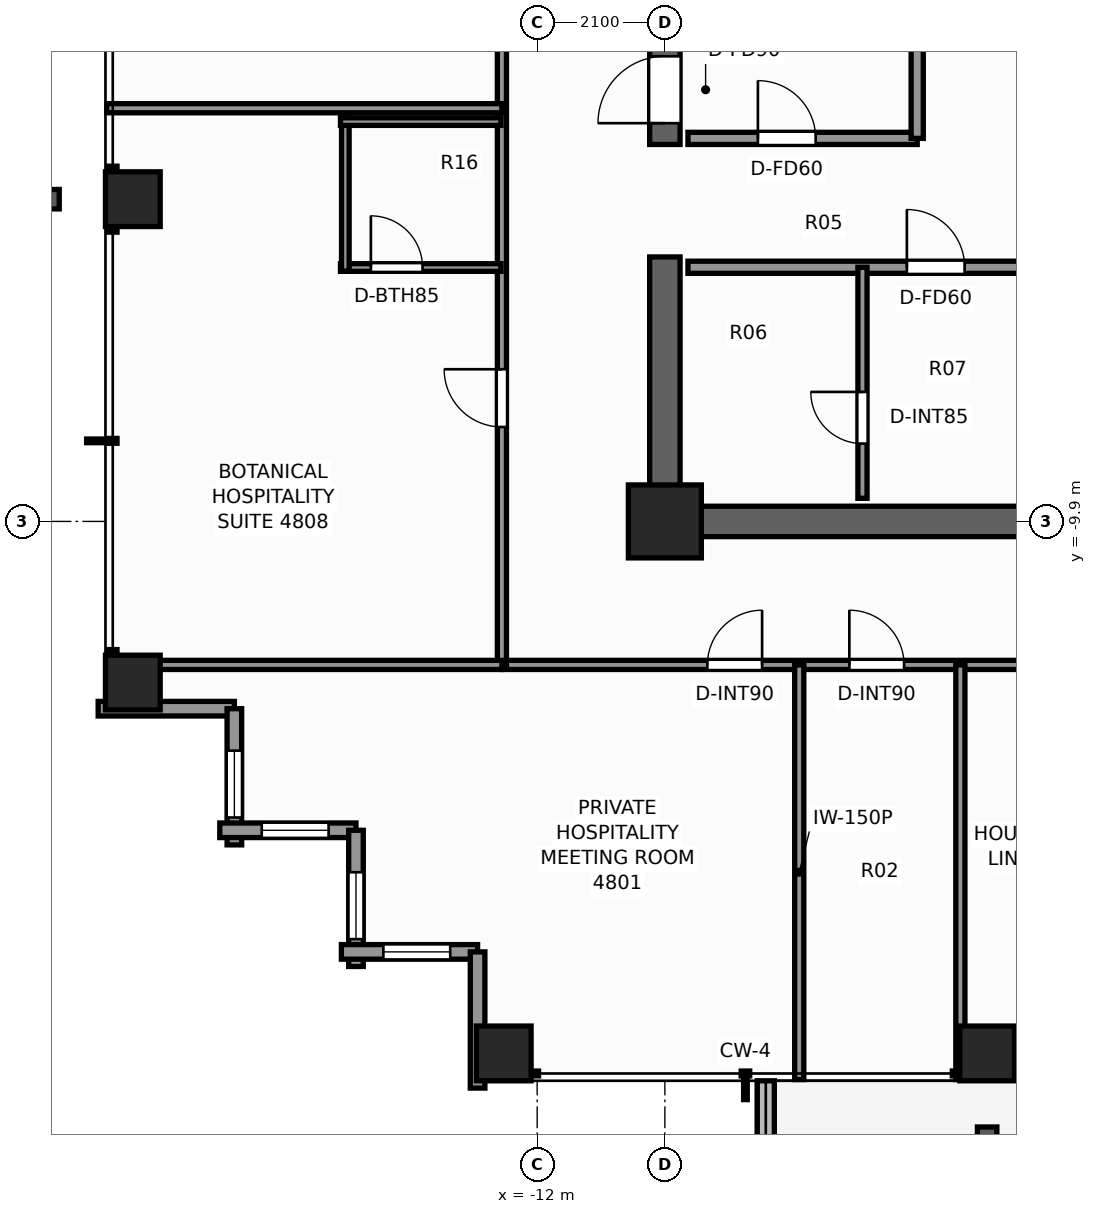
"""IFC4 building model, lengths in metres.
Left out: names, types, materials, properties, quantities, classifications, styles, units other than length and angle.
Written with IfcOpenShell. Run it as: python <this file> out.ifc"""

import sys

from ifc_helpers import new_model, si_unit, direction, frame, frame_2d, origin, origin_2d, place, context, subcontext, project, spatial, rectangle, extrude, element, fill, save


model = new_model("IFC4")
c1 = context("Model", 3, precision=1e-05, world=origin(), true_north=direction((0.0, 1.0)))
c2 = subcontext(c1, "Body", "Model", "MODEL_VIEW")
j1 = project(units=[si_unit("LENGTHUNIT", "METRE"), si_unit("PLANEANGLEUNIT", "RADIAN")], contexts=[c1])
p1 = place(None, origin())
s1 = spatial("IfcSite", under=j1, at=p1, CompositionType="ELEMENT")
p2 = place(p1, origin())
s2 = spatial("IfcBuilding", under=s1, at=p2, CompositionType="ELEMENT")
p3 = place(p2, frame((0.0, 0.0, 166.8)))
s3 = spatial("IfcBuildingStorey", under=s2, at=p3, CompositionType="ELEMENT", Elevation=166.8)
p4 = place(p3, frame((-3.54, -9.9, 0.0), z_axis=(0.0, 0.0, 1.0), x_axis=(-1.0, 0.0, 0.0)))
e1 = element("IfcWall", 1, at=p4, inside=s3, PredefinedType="SHEAR", context=c2, shape_type="SweptSolid", body=[
    extrude(rectangle(XDim=6.61, YDim=0.5, at=frame_2d((3.305, 0.0))), origin(), (0.0, 0.0, 1.0), 3.3),
])
p5 = place(p3, frame((-9.9, -9.65, 0.0), z_axis=(0.0, 0.0, 1.0), x_axis=(0.0, 1.0, 0.0)))
e2 = element("IfcWall", 2, at=p5, inside=s3, PredefinedType="SHEAR", context=c2, shape_type="SweptSolid", body=[
    extrude(rectangle(XDim=4.1, YDim=0.5, at=frame_2d((2.05, 0.0))), origin(), (0.0, 0.0, 1.0), 3.3),
])
p6 = place(p3, frame((-9.9, -3.7, 0.0), z_axis=(0.0, 0.0, 1.0), x_axis=(0.0, 1.0, 0.0)))
e3 = element("IfcWall", 3, at=p6, inside=s3, PredefinedType="SHEAR", context=c2, shape_type="SweptSolid", body=[
    extrude(rectangle(XDim=13.35, YDim=0.5, at=frame_2d((6.675, 0.0))), origin(), (0.0, 0.0, 1.0), 3.3),
])
p7 = place(p6, frame((0.35, 0.0, 0.0)))
e4 = element("IfcOpeningElement", 4, at=p7, cuts=e3, PredefinedType="OPENING", context=c2, shape_type="SweptSolid", body=[
    extrude(rectangle(XDim=1.1, YDim=2.2, at=frame_2d((0.55, 1.1))), frame((0.0, 0.26, 0.0), z_axis=(0.0, -1.0, 0.0), x_axis=(1.0, 0.0, 0.0)), (0.0, 0.0, 1.0), 0.52),
])
p8 = place(p3, frame((-9.9, -9.9, 0.0), z_axis=(0.0, 0.0, 1.0), x_axis=(1.0, 0.0, 0.0)))
e5 = element("IfcColumn", 5, at=p8, inside=s3, PredefinedType="COLUMN", context=c2, shape_type="SweptSolid", body=[
    extrude(rectangle(XDim=1.2, YDim=1.2, at=origin_2d()), origin(), (0.0, 0.0, 1.0), 3.3),
])
for number, where, z_axis, x_axis in (
    (6, (-12.55, -18.65, 0.0), (0.0, 0.0, 1.0), (1.0, 0.0, 0.0)),
    (7, (-4.6, -18.65, 0.0), (0.0, 0.0, 1.0), (1.0, 0.0, 0.0)),
    (8, (-18.65, -12.55, 0.0), (0.0, 0.0, 1.0), (1.0, 0.0, 0.0)),
    (9, (-18.65, -4.6, 0.0), (0.0, 0.0, 1.0), (1.0, 0.0, 0.0)),
):
    element("IfcColumn", number, at=place(p3, frame(where, z_axis=z_axis, x_axis=x_axis)), inside=s3, PredefinedType="COLUMN", context=c2, shape_type="SweptSolid", body=[
        extrude(rectangle(XDim=0.9, YDim=0.9, at=origin_2d()), origin(), (0.0, 0.0, 1.0), 3.3),
    ])
p9 = place(p3, frame((-8.24, -19.1, -0.02), z_axis=(0.0, 0.0, 1.0), x_axis=(0.0, -1.0, 0.0)))
e10 = element("IfcWall", 10, at=p9, inside=s3, PredefinedType="PARAPET", context=c2, shape_type="SweptSolid", body=[
    extrude(rectangle(XDim=1.466, YDim=0.28, at=frame_2d((0.733, 0.0))), origin(), (0.0, 0.0, 1.0), 0.42),
])
p10 = place(p3, frame((-16.98, -12.98, 0.0), z_axis=(0.0, 0.0, 1.0), x_axis=(-1.0, 0.0, 0.0)))
e11 = element("IfcWall", 11, at=p10, inside=s3, PredefinedType="STANDARD", context=c2, shape_type="SweptSolid", body=[
    extrude(rectangle(XDim=2.24, YDim=0.24, at=frame_2d((1.12, 0.0))), origin(), (0.0, 0.0, 1.0), 2.483),
])
p11 = place(p3, frame((-16.98, -15.22, 0.0), z_axis=(0.0, 0.0, 1.0), x_axis=(0.0, 1.0, 0.0)))
e12 = element("IfcWall", 12, at=p11, inside=s3, PredefinedType="STANDARD", context=c2, shape_type="SweptSolid", body=[
    extrude(rectangle(XDim=2.24, YDim=0.24, at=frame_2d((1.12, 0.0))), origin(), (0.0, 0.0, 1.0), 2.483),
])
p12 = place(p11, frame((0.45, 0.0, 0.65)))
e13 = element("IfcOpeningElement", 13, at=p12, cuts=e12, PredefinedType="OPENING", context=c2, shape_type="SweptSolid", body=[
    extrude(rectangle(XDim=1.1, YDim=1.45, at=frame_2d((0.55, 0.725))), frame((0.0, 0.13, 0.0), z_axis=(0.0, -1.0, 0.0), x_axis=(1.0, 0.0, 0.0)), (0.0, 0.0, 1.0), 0.26),
])
p13 = place(p3, frame((-14.98, -14.98, 0.0), z_axis=(0.0, 0.0, 1.0), x_axis=(-1.0, 0.0, 0.0)))
e14 = element("IfcWall", 14, at=p13, inside=s3, PredefinedType="STANDARD", context=c2, shape_type="SweptSolid", body=[
    extrude(rectangle(XDim=2.24, YDim=0.24, at=frame_2d((1.12, 0.0))), origin(), (0.0, 0.0, 1.0), 2.483),
])
p14 = place(p13, frame((0.45, 0.0, 0.65)))
e15 = element("IfcOpeningElement", 15, at=p14, cuts=e14, PredefinedType="OPENING", context=c2, shape_type="SweptSolid", body=[
    extrude(rectangle(XDim=1.1, YDim=1.45, at=frame_2d((0.55, 0.725))), frame((0.0, 0.13, 0.0), z_axis=(0.0, -1.0, 0.0), x_axis=(1.0, 0.0, 0.0)), (0.0, 0.0, 1.0), 0.26),
])
p15 = place(p3, frame((-14.98, -17.22, 0.0), z_axis=(0.0, 0.0, 1.0), x_axis=(0.0, 1.0, 0.0)))
e16 = element("IfcWall", 16, at=p15, inside=s3, PredefinedType="STANDARD", context=c2, shape_type="SweptSolid", body=[
    extrude(rectangle(XDim=2.24, YDim=0.24, at=frame_2d((1.12, 0.0))), origin(), (0.0, 0.0, 1.0), 2.483),
])
p16 = place(p15, frame((0.45, 0.0, 0.65)))
e17 = element("IfcOpeningElement", 17, at=p16, cuts=e16, PredefinedType="OPENING", context=c2, shape_type="SweptSolid", body=[
    extrude(rectangle(XDim=1.1, YDim=1.45, at=frame_2d((0.55, 0.725))), frame((0.0, 0.13, 0.0), z_axis=(0.0, -1.0, 0.0), x_axis=(1.0, 0.0, 0.0)), (0.0, 0.0, 1.0), 0.26),
])
p17 = place(p3, frame((-12.98, -16.98, 0.0), z_axis=(0.0, 0.0, 1.0), x_axis=(-1.0, 0.0, 0.0)))
e18 = element("IfcWall", 18, at=p17, inside=s3, PredefinedType="STANDARD", context=c2, shape_type="SweptSolid", body=[
    extrude(rectangle(XDim=2.24, YDim=0.24, at=frame_2d((1.12, 0.0))), origin(), (0.0, 0.0, 1.0), 2.483),
])
p18 = place(p17, frame((0.45, 0.0, 0.65)))
e19 = element("IfcOpeningElement", 19, at=p18, cuts=e18, PredefinedType="OPENING", context=c2, shape_type="SweptSolid", body=[
    extrude(rectangle(XDim=1.1, YDim=1.45, at=frame_2d((0.55, 0.725))), frame((0.0, 0.13, 0.0), z_axis=(0.0, -1.0, 0.0), x_axis=(1.0, 0.0, 0.0)), (0.0, 0.0, 1.0), 0.26),
])
p19 = place(p3, frame((-12.98, -19.22, 0.0), z_axis=(0.0, 0.0, 1.0), x_axis=(0.0, 1.0, 0.0)))
e20 = element("IfcWall", 20, at=p19, inside=s3, PredefinedType="STANDARD", context=c2, shape_type="SweptSolid", body=[
    extrude(rectangle(XDim=2.24, YDim=0.24, at=frame_2d((1.12, 0.0))), origin(), (0.0, 0.0, 1.0), 2.483),
])
p20 = place(p3, frame((-9.52, -3.6, 0.0), z_axis=(0.0, 0.0, 1.0), x_axis=(1.0, 0.0, 0.0)))
e21 = element("IfcWall", 21, at=p20, inside=s3, PredefinedType="SOLIDWALL", context=c2, shape_type="SweptSolid", body=[
    extrude(rectangle(XDim=3.77, YDim=0.2, at=frame_2d((1.885, 0.0))), origin(), (0.0, 0.0, 1.0), 3.1),
])
p21 = place(p20, frame((1.15, 0.0, 0.0)))
e22 = element("IfcOpeningElement", 22, at=p21, cuts=e21, PredefinedType="OPENING", context=c2, shape_type="SweptSolid", body=[
    extrude(rectangle(XDim=0.95, YDim=2.06, at=frame_2d((0.475, 1.03))), frame((0.0, 0.11, 0.0), z_axis=(0.0, -1.0, 0.0), x_axis=(1.0, 0.0, 0.0)), (0.0, 0.0, 1.0), 0.22),
])
p22 = place(p3, frame((-5.75, -3.6, 0.0), z_axis=(0.0, 0.0, 1.0), x_axis=(0.0, 1.0, 0.0)))
e23 = element("IfcWall", 23, at=p22, inside=s3, PredefinedType="SOLIDWALL", context=c2, shape_type="SweptSolid", body=[
    extrude(rectangle(XDim=5.57, YDim=0.2, at=frame_2d((2.785, 0.0))), origin(), (0.0, 0.0, 1.0), 2.735),
])
p23 = place(p22, frame((2.75, 0.0, 0.0)))
e24 = element("IfcOpeningElement", 24, at=p23, cuts=e23, PredefinedType="OPENING", context=c2, shape_type="SweptSolid", body=[
    extrude(rectangle(XDim=1.1, YDim=2.2, at=frame_2d((0.55, 1.1))), frame((0.0, 0.11, 0.0), z_axis=(0.0, -1.0, 0.0), x_axis=(1.0, 0.0, 0.0)), (0.0, 0.0, 1.0), 0.22),
])
p24 = place(p3, frame((-9.52, -5.72, 0.0), z_axis=(0.0, 0.0, 1.0), x_axis=(1.0, 0.0, 0.0)))
e25 = element("IfcWall", 25, at=p24, inside=s3, PredefinedType="SOLIDWALL", context=c2, shape_type="SweptSolid", body=[
    extrude(rectangle(XDim=5.66, YDim=0.2, at=frame_2d((2.83, 0.0))), origin(), (0.0, 0.0, 1.0), 3.1),
])
p25 = place(p24, frame((3.6, 0.0, 0.0)))
e26 = element("IfcOpeningElement", 26, at=p25, cuts=e25, PredefinedType="OPENING", context=c2, shape_type="SweptSolid", body=[
    extrude(rectangle(XDim=0.95, YDim=2.06, at=frame_2d((0.475, 1.03))), frame((0.0, 0.11, 0.0), z_axis=(0.0, -1.0, 0.0), x_axis=(1.0, 0.0, 0.0)), (0.0, 0.0, 1.0), 0.22),
])
p26 = place(p3, frame((-6.65, -9.52, 0.0), z_axis=(0.0, 0.0, 1.0), x_axis=(0.0, 1.0, 0.0)))
e27 = element("IfcWall", 27, at=p26, inside=s3, PredefinedType="PARTITIONING", context=c2, shape_type="SweptSolid", body=[
    extrude(rectangle(XDim=3.8, YDim=0.15, at=frame_2d((1.9, 0.0))), origin(), (0.0, 0.0, 1.0), 3.1),
])
p27 = place(p26, frame((0.9, 0.0, 0.0)))
e28 = element("IfcOpeningElement", 28, at=p27, cuts=e27, PredefinedType="OPENING", context=c2, shape_type="SweptSolid", body=[
    extrude(rectangle(XDim=0.85, YDim=2.03, at=frame_2d((0.425, 1.015))), frame((0.0, 0.085, 0.0), z_axis=(0.0, -1.0, 0.0), x_axis=(1.0, 0.0, 0.0)), (0.0, 0.0, 1.0), 0.17),
])
p28 = place(p3, frame((-12.58, -12.26, 0.0), z_axis=(0.0, 0.0, 1.0), x_axis=(1.0, 0.0, 0.0)))
e29 = element("IfcWall", 29, at=p28, inside=s3, PredefinedType="PARTITIONING", context=c2, shape_type="SweptSolid", body=[
    extrude(rectangle(XDim=25.0, YDim=0.15, at=frame_2d((12.5, 0.0))), origin(), (0.0, 0.0, 1.0), 2.389),
])
p29 = place(p28, frame((3.379, 0.0, 0.0)))
e30 = element("IfcOpeningElement", 30, at=p29, cuts=e29, PredefinedType="OPENING", context=c2, shape_type="SweptSolid", body=[
    extrude(rectangle(XDim=0.9, YDim=2.06, at=frame_2d((0.45, 1.03))), frame((0.0, 0.085, 0.0), z_axis=(0.0, -1.0, 0.0), x_axis=(1.0, 0.0, 0.0)), (0.0, 0.0, 1.0), 0.17),
])
p30 = place(p28, frame((5.714, 0.0, 0.0)))
e31 = element("IfcOpeningElement", 31, at=p30, cuts=e29, PredefinedType="OPENING", context=c2, shape_type="SweptSolid", body=[
    extrude(rectangle(XDim=0.9, YDim=2.06, at=frame_2d((0.45, 1.03))), frame((0.0, 0.085, 0.0), z_axis=(0.0, -1.0, 0.0), x_axis=(1.0, 0.0, 0.0)), (0.0, 0.0, 1.0), 0.17),
])
p31 = place(p28, frame((8.985, 0.0, 0.0)))
e32 = element("IfcOpeningElement", 32, at=p31, cuts=e29, PredefinedType="OPENING", context=c2, shape_type="SweptSolid", body=[
    extrude(rectangle(XDim=0.9, YDim=2.06, at=frame_2d((0.45, 1.03))), frame((0.0, 0.085, 0.0), z_axis=(0.0, -1.0, 0.0), x_axis=(1.0, 0.0, 0.0)), (0.0, 0.0, 1.0), 0.17),
])
p32 = place(p28, frame((13.698, 0.0, 0.0)))
e33 = element("IfcOpeningElement", 33, at=p32, cuts=e29, PredefinedType="OPENING", context=c2, shape_type="SweptSolid", body=[
    extrude(rectangle(XDim=0.95, YDim=2.06, at=frame_2d((0.475, 1.03))), frame((0.0, 0.085, 0.0), z_axis=(0.0, -1.0, 0.0), x_axis=(1.0, 0.0, 0.0)), (0.0, 0.0, 1.0), 0.17),
])
p33 = place(p28, frame((19.665, 0.0, 0.0)))
e34 = element("IfcOpeningElement", 34, at=p33, cuts=e29, PredefinedType="OPENING", context=c2, shape_type="SweptSolid", body=[
    extrude(rectangle(XDim=0.9, YDim=2.06, at=frame_2d((0.45, 1.03))), frame((0.0, 0.085, 0.0), z_axis=(0.0, -1.0, 0.0), x_axis=(1.0, 0.0, 0.0)), (0.0, 0.0, 1.0), 0.17),
])
p34 = place(p3, frame((-12.58, -12.26, 0.0), z_axis=(0.0, 0.0, 1.0), x_axis=(0.0, 1.0, 0.0)))
e35 = element("IfcWall", 35, at=p34, inside=s3, PredefinedType="PARTITIONING", context=c2, shape_type="SweptSolid", body=[
    extrude(rectangle(XDim=24.84, YDim=0.15, at=frame_2d((12.42, 0.0))), origin(), (0.0, 0.0, 1.0), 2.389),
])
p35 = place(p34, frame((3.913, 0.0, 0.0)))
e36 = element("IfcOpeningElement", 36, at=p35, cuts=e35, PredefinedType="OPENING", context=c2, shape_type="SweptSolid", body=[
    extrude(rectangle(XDim=0.95, YDim=2.06, at=frame_2d((0.475, 1.03))), frame((0.0, 0.085, 0.0), z_axis=(0.0, -1.0, 0.0), x_axis=(1.0, 0.0, 0.0)), (0.0, 0.0, 1.0), 0.17),
])
p36 = place(p34, frame((19.345, 0.0, 0.0)))
e37 = element("IfcOpeningElement", 37, at=p36, cuts=e35, PredefinedType="OPENING", context=c2, shape_type="SweptSolid", body=[
    extrude(rectangle(XDim=0.9, YDim=2.06, at=frame_2d((0.45, 1.03))), frame((0.0, 0.085, 0.0), z_axis=(0.0, -1.0, 0.0), x_axis=(1.0, 0.0, 0.0)), (0.0, 0.0, 1.0), 0.17),
])
p37 = place(p3, frame((-19.08, -12.26, 0.0), z_axis=(0.0, 0.0, 1.0), x_axis=(1.0, 0.0, 0.0)))
e38 = element("IfcWall", 38, at=p37, inside=s3, PredefinedType="PARTITIONING", context=c2, shape_type="SweptSolid", body=[
    extrude(rectangle(XDim=6.5, YDim=0.15, at=frame_2d((3.25, 0.0))), origin(), (0.0, 0.0, 1.0), 2.389),
])
for number, where, z_axis, x_axis in (
    (39, (-7.69, -19.08, 0.0), (0.0, 0.0, 1.0), (0.0, 1.0, 0.0)),
    (40, (-5.04, -19.08, 0.0), (0.0, 0.0, 1.0), (0.0, 1.0, 0.0)),
):
    element("IfcWall", number, at=place(p3, frame(where, z_axis=z_axis, x_axis=x_axis)), inside=s3, PredefinedType="PARTITIONING", context=c2, shape_type="SweptSolid", body=[
        extrude(rectangle(XDim=6.82, YDim=0.15, at=frame_2d((3.41, 0.0))), origin(), (0.0, 0.0, 1.0), 2.473),
    ])
p38 = place(p3, frame((-19.08, -3.104, 0.0), z_axis=(0.0, 0.0, 1.0), x_axis=(1.0, 0.0, 0.0)))
e41 = element("IfcWall", 41, at=p38, inside=s3, PredefinedType="PARTITIONING", context=c2, shape_type="SweptSolid", body=[
    extrude(rectangle(XDim=6.5, YDim=0.15, at=frame_2d((3.25, 0.0))), origin(), (0.0, 0.0, 1.0), 2.473),
])
p39 = place(p3, frame((-15.235, -5.724, 0.0), z_axis=(0.0, 0.0, 1.0), x_axis=(1.0, 0.0, 0.0)))
e42 = element("IfcWall", 42, at=p39, inside=s3, PredefinedType="PARTITIONING", context=c2, shape_type="SweptSolid", body=[
    extrude(rectangle(XDim=2.64, YDim=0.125, at=frame_2d((1.32, 0.0))), origin(), (0.0, 0.0, 1.0), 3.1),
])
p40 = place(p39, frame((0.5, 0.0, 0.0)))
e43 = element("IfcOpeningElement", 43, at=p40, cuts=e42, PredefinedType="OPENING", context=c2, shape_type="SweptSolid", body=[
    extrude(rectangle(XDim=0.85, YDim=2.03, at=frame_2d((0.425, 1.015))), frame((0.0, 0.073, 0.0), z_axis=(0.0, -1.0, 0.0), x_axis=(1.0, 0.0, 0.0)), (0.0, 0.0, 1.0), 0.145),
])
p41 = place(p3, frame((-15.155, -5.784, 0.0), z_axis=(0.0, 0.0, 1.0), x_axis=(0.0, 1.0, 0.0)))
e44 = element("IfcWall", 44, at=p41, inside=s3, PredefinedType="PARTITIONING", context=c2, shape_type="SweptSolid", body=[
    extrude(rectangle(XDim=2.52, YDim=0.125, at=frame_2d((1.26, 0.0))), origin(), (0.0, 0.0, 1.0), 2.389),
])
p42 = place(p3, frame((-15.235, -3.324, 0.0), z_axis=(0.0, 0.0, 1.0), x_axis=(1.0, 0.0, 0.0)))
e45 = element("IfcWall", 45, at=p42, inside=s3, PredefinedType="PARTITIONING", context=c2, shape_type="SweptSolid", body=[
    extrude(rectangle(XDim=2.64, YDim=0.125, at=frame_2d((1.32, 0.0))), origin(), (0.0, 0.0, 1.0), 3.1),
])
p43 = place(p12, origin())
e46 = element("IfcWindow", 46, at=p43, inside=s3, PartitioningType="SINGLE_PANEL", PredefinedType="WINDOW", context=c2, shape_type="SweptSolid", body=[
    extrude(rectangle(XDim=1.1, YDim=1.45, at=frame_2d((0.55, 0.725))), frame((0.0, 0.03, 0.0), z_axis=(0.0, -1.0, 0.0), x_axis=(1.0, 0.0, 0.0)), (0.0, 0.0, 1.0), 0.06),
])
fill(e13, e46)
p44 = place(p14, origin())
e47 = element("IfcWindow", 47, at=p44, inside=s3, PartitioningType="SINGLE_PANEL", PredefinedType="WINDOW", context=c2, shape_type="SweptSolid", body=[
    extrude(rectangle(XDim=1.1, YDim=1.45, at=frame_2d((0.55, 0.725))), frame((0.0, 0.03, 0.0), z_axis=(0.0, -1.0, 0.0), x_axis=(1.0, 0.0, 0.0)), (0.0, 0.0, 1.0), 0.06),
])
fill(e15, e47)
p45 = place(p16, origin())
e48 = element("IfcWindow", 48, at=p45, inside=s3, PartitioningType="SINGLE_PANEL", PredefinedType="WINDOW", context=c2, shape_type="SweptSolid", body=[
    extrude(rectangle(XDim=1.1, YDim=1.45, at=frame_2d((0.55, 0.725))), frame((0.0, 0.03, 0.0), z_axis=(0.0, -1.0, 0.0), x_axis=(1.0, 0.0, 0.0)), (0.0, 0.0, 1.0), 0.06),
])
fill(e17, e48)
p46 = place(p18, origin())
e49 = element("IfcWindow", 49, at=p46, inside=s3, PartitioningType="SINGLE_PANEL", PredefinedType="WINDOW", context=c2, shape_type="SweptSolid", body=[
    extrude(rectangle(XDim=1.1, YDim=1.45, at=frame_2d((0.55, 0.725))), frame((0.0, 0.03, 0.0), z_axis=(0.0, -1.0, 0.0), x_axis=(1.0, 0.0, 0.0)), (0.0, 0.0, 1.0), 0.06),
])
fill(e19, e49)
p47 = place(p7, origin())
e50 = element("IfcDoor", 50, at=p47, inside=s3, OperationType="SINGLE_SWING_LEFT", PredefinedType="DOOR", context=c2, shape_type="SweptSolid", body=[
    extrude(rectangle(XDim=1.1, YDim=2.2, at=frame_2d((0.55, 1.1))), frame((0.0, 0.025, 0.0), z_axis=(0.0, -1.0, 0.0), x_axis=(1.0, 0.0, 0.0)), (0.0, 0.0, 1.0), 0.05),
])
fill(e4, e50)
p48 = place(p25, origin())
e51 = element("IfcDoor", 51, at=p48, inside=s3, OperationType="SINGLE_SWING_LEFT", PredefinedType="DOOR", context=c2, shape_type="SweptSolid", body=[
    extrude(rectangle(XDim=0.95, YDim=2.06, at=frame_2d((0.475, 1.03))), frame((0.0, 0.025, 0.0), z_axis=(0.0, -1.0, 0.0), x_axis=(1.0, 0.0, 0.0)), (0.0, 0.0, 1.0), 0.05),
])
fill(e26, e51)
p49 = place(p27, origin())
e52 = element("IfcDoor", 52, at=p49, inside=s3, OperationType="SINGLE_SWING_RIGHT", PredefinedType="DOOR", context=c2, shape_type="SweptSolid", body=[
    extrude(rectangle(XDim=0.85, YDim=2.03, at=frame_2d((0.425, 1.015))), frame((0.0, 0.025, 0.0), z_axis=(0.0, -1.0, 0.0), x_axis=(1.0, 0.0, 0.0)), (0.0, 0.0, 1.0), 0.05),
])
fill(e28, e52)
p50 = place(p21, origin())
e53 = element("IfcDoor", 53, at=p50, inside=s3, OperationType="SINGLE_SWING_LEFT", PredefinedType="DOOR", context=c2, shape_type="SweptSolid", body=[
    extrude(rectangle(XDim=0.95, YDim=2.06, at=frame_2d((0.475, 1.03))), frame((0.0, 0.025, 0.0), z_axis=(0.0, -1.0, 0.0), x_axis=(1.0, 0.0, 0.0)), (0.0, 0.0, 1.0), 0.05),
])
fill(e22, e53)
p51 = place(p29, origin())
e54 = element("IfcDoor", 54, at=p51, inside=s3, OperationType="SINGLE_SWING_RIGHT", PredefinedType="DOOR", context=c2, shape_type="SweptSolid", body=[
    extrude(rectangle(XDim=0.9, YDim=2.06, at=frame_2d((0.45, 1.03))), frame((0.0, 0.025, 0.0), z_axis=(0.0, -1.0, 0.0), x_axis=(1.0, 0.0, 0.0)), (0.0, 0.0, 1.0), 0.05),
])
fill(e30, e54)
p52 = place(p30, origin())
e55 = element("IfcDoor", 55, at=p52, inside=s3, OperationType="SINGLE_SWING_LEFT", PredefinedType="DOOR", context=c2, shape_type="SweptSolid", body=[
    extrude(rectangle(XDim=0.9, YDim=2.06, at=frame_2d((0.45, 1.03))), frame((0.0, 0.025, 0.0), z_axis=(0.0, -1.0, 0.0), x_axis=(1.0, 0.0, 0.0)), (0.0, 0.0, 1.0), 0.05),
])
fill(e31, e55)
p53 = place(p40, origin())
e56 = element("IfcDoor", 56, at=p53, inside=s3, OperationType="SINGLE_SWING_LEFT", PredefinedType="DOOR", context=c2, shape_type="SweptSolid", body=[
    extrude(rectangle(XDim=0.85, YDim=2.03, at=frame_2d((0.425, 1.015))), frame((0.0, 0.025, 0.0), z_axis=(0.0, -1.0, 0.0), x_axis=(1.0, 0.0, 0.0)), (0.0, 0.0, 1.0), 0.05),
])
fill(e43, e56)
p54 = place(p35, origin())
e57 = element("IfcDoor", 57, at=p54, inside=s3, OperationType="SINGLE_SWING_RIGHT", PredefinedType="DOOR", context=c2, shape_type="SweptSolid", body=[
    extrude(rectangle(XDim=0.95, YDim=2.06, at=frame_2d((0.475, 1.03))), frame((0.0, 0.025, 0.0), z_axis=(0.0, -1.0, 0.0), x_axis=(1.0, 0.0, 0.0)), (0.0, 0.0, 1.0), 0.05),
])
fill(e36, e57)
save(model, sys.argv[1])
